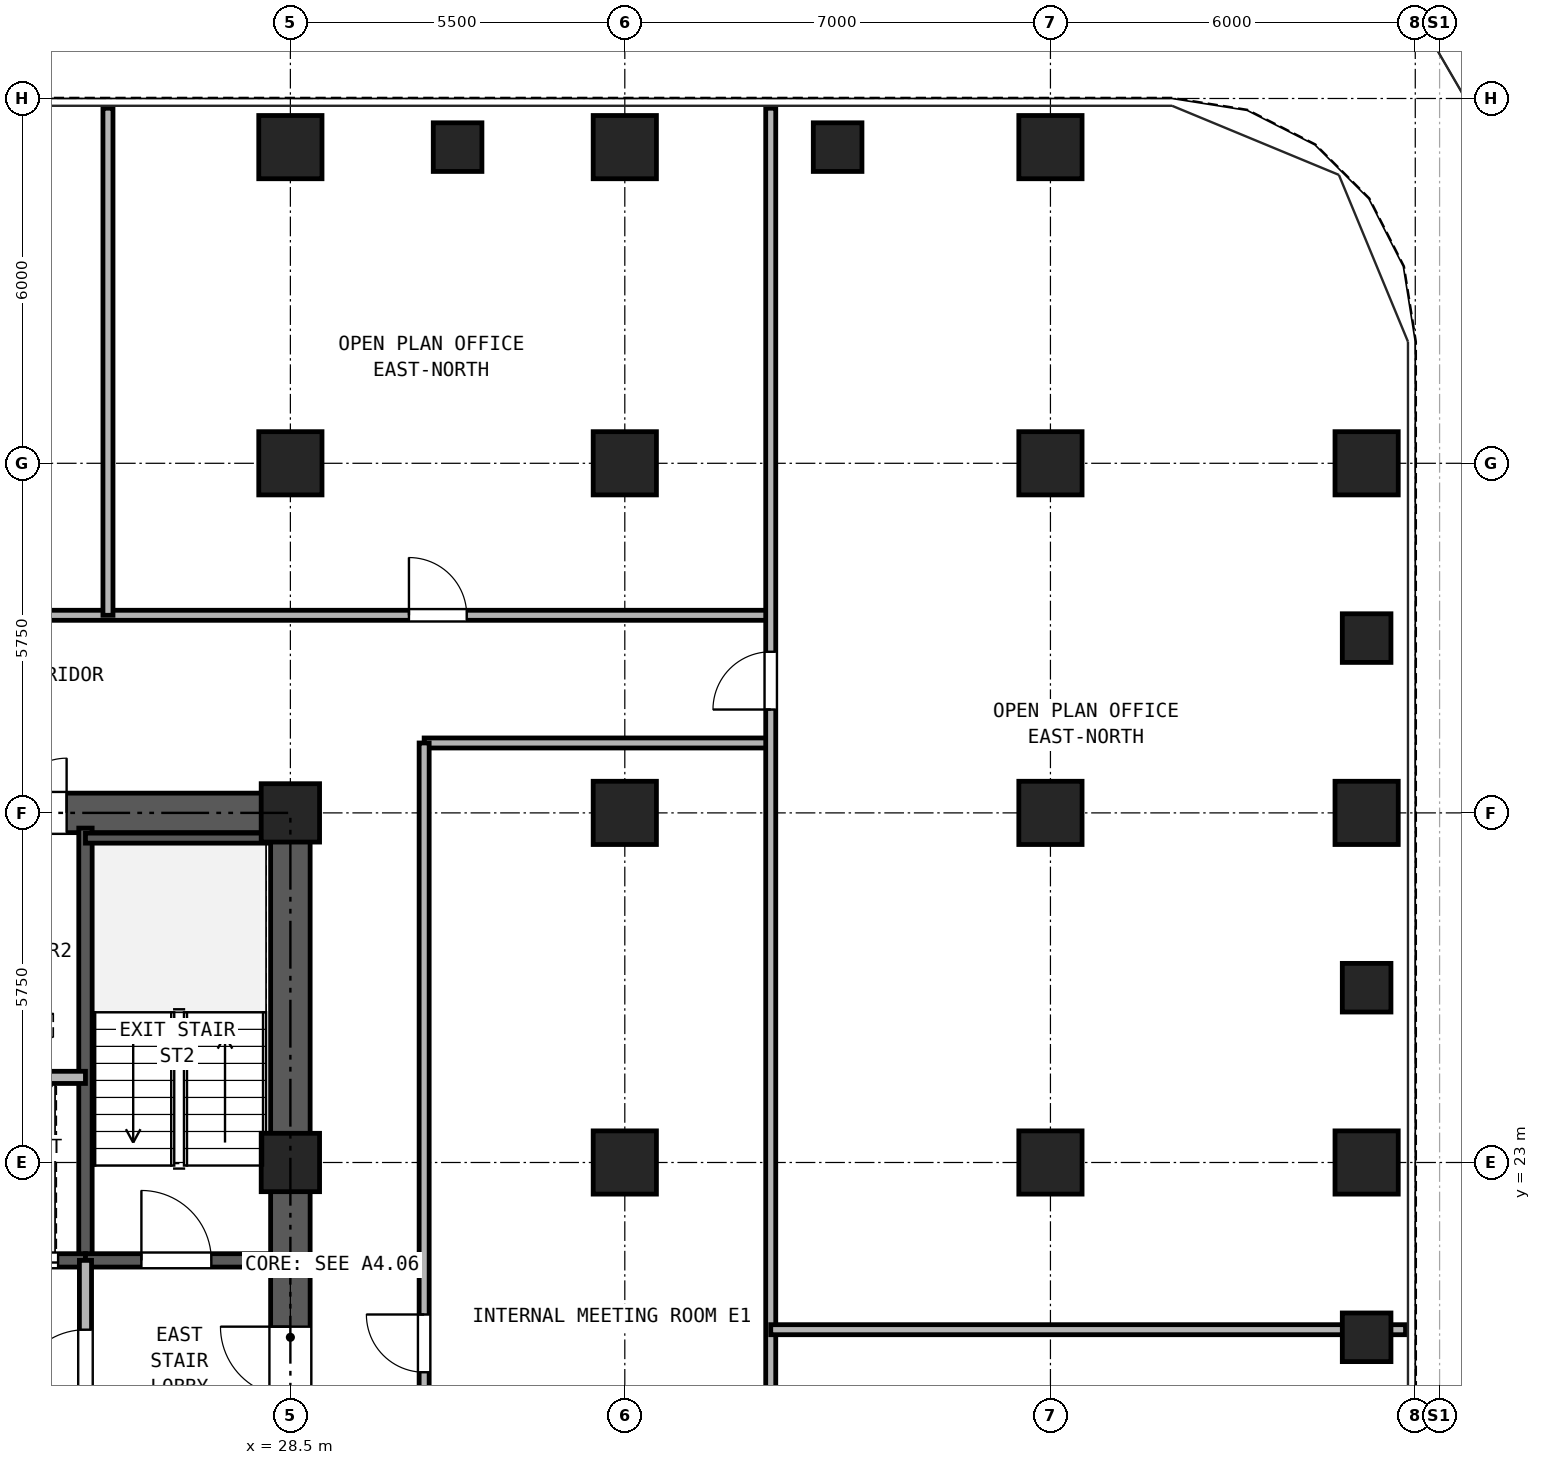
"""IFC4 building model, lengths in metres.
Left out: names, types, materials, properties, quantities, classifications, styles, units other than length and angle.
Written with IfcOpenShell. Run it as: python <this file> out.ifc"""

import sys

from ifc_helpers import new_model, si_unit, direction, frame, frame_2d, origin, origin_2d, place, context, subcontext, project, spatial, rectangle, hollow_rectangle, extrude, source, transform, mapped, element, fill, save


model = new_model("IFC4")
c1 = context("Model", 3, precision=1e-05, world=origin(), true_north=direction((0.0, 1.0)))
c2 = subcontext(c1, "Body", "Model", "MODEL_VIEW")
j1 = project(units=[si_unit("LENGTHUNIT", "METRE"), si_unit("PLANEANGLEUNIT", "RADIAN")], contexts=[c1])
p1 = place(None, origin())
s1 = spatial("IfcSite", under=j1, at=p1, CompositionType="ELEMENT")
p2 = place(p1, origin())
s2 = spatial("IfcBuilding", under=s1, at=p2, CompositionType="ELEMENT")
p3 = place(p2, frame((0.0, 0.0, 44.1)))
s3 = spatial("IfcBuildingStorey", under=s2, at=p3, CompositionType="ELEMENT", Elevation=44.1)
m1 = source(origin(), c2, "Body", "SweptSolid", [
    extrude(hollow_rectangle(XDim=1.04, YDim=1.04, WallThickness=0.065, at=origin_2d()), origin(), (0.0, 0.0, 1.0), 3.32),
])
for number, where, z_axis, x_axis in (
    (1, (28.5, 39.7, 0.0), (0.0, 0.0, 1.0), (1.0, 0.0, 0.0)),
    (2, (34.0, 39.7, 0.0), (0.0, 0.0, 1.0), (1.0, 0.0, 0.0)),
    (3, (41.0, 39.7, 0.0), (0.0, 0.0, 1.0), (1.0, 0.0, 0.0)),
    (4, (46.2, 23.0, 0.0), (0.0, 0.0, 1.0), (1.0, 0.0, 0.0)),
    (5, (46.2, 28.75, 0.0), (0.0, 0.0, 1.0), (1.0, 0.0, 0.0)),
    (6, (46.2, 34.5, 0.0), (0.0, 0.0, 1.0), (1.0, 0.0, 0.0)),
):
    element("IfcColumn", number, at=place(p3, frame(where, z_axis=z_axis, x_axis=x_axis)), inside=s3, PredefinedType="COLUMN", context=c2, shape_type="MappedRepresentation", body=[
        mapped(m1, transform((0.0, 0.0, 0.0), x_axis=(1.0, 0.0, 0.0), y_axis=(0.0, 1.0, 0.0), z_axis=(0.0, 0.0, 1.0), scale=1.0)),
    ])
m2 = source(origin(), c2, "Body", "SweptSolid", [
    extrude(hollow_rectangle(XDim=0.96, YDim=0.96, WallThickness=0.06, at=origin_2d()), origin(), (0.0, 0.0, 1.0), 3.32),
])
for number, where, z_axis, x_axis in (
    (7, (28.5, 23.0, 0.0), (0.0, 0.0, 1.0), (1.0, 0.0, 0.0)),
    (8, (28.5, 28.75, 0.0), (0.0, 0.0, 1.0), (1.0, 0.0, 0.0)),
):
    element("IfcColumn", number, at=place(p3, frame(where, z_axis=z_axis, x_axis=x_axis)), inside=s3, PredefinedType="COLUMN", context=c2, shape_type="MappedRepresentation", body=[
        mapped(m2, transform((0.0, 0.0, 0.0), x_axis=(1.0, 0.0, 0.0), y_axis=(0.0, 1.0, 0.0), z_axis=(0.0, 0.0, 1.0), scale=1.0)),
    ])
for number, where, z_axis, x_axis in (
    (9, (28.5, 34.5, 0.0), (0.0, 0.0, 1.0), (1.0, 0.0, 0.0)),
    (10, (34.0, 23.0, 0.0), (0.0, 0.0, 1.0), (1.0, 0.0, 0.0)),
    (11, (34.0, 28.75, 0.0), (0.0, 0.0, 1.0), (1.0, 0.0, 0.0)),
    (12, (34.0, 34.5, 0.0), (0.0, 0.0, 1.0), (1.0, 0.0, 0.0)),
    (13, (41.0, 23.0, 0.0), (0.0, 0.0, 1.0), (1.0, 0.0, 0.0)),
    (14, (41.0, 28.75, 0.0), (0.0, 0.0, 1.0), (1.0, 0.0, 0.0)),
    (15, (41.0, 34.5, 0.0), (0.0, 0.0, 1.0), (1.0, 0.0, 0.0)),
):
    element("IfcColumn", number, at=place(p3, frame(where, z_axis=z_axis, x_axis=x_axis)), inside=s3, PredefinedType="COLUMN", context=c2, shape_type="MappedRepresentation", body=[
        mapped(m1, transform((0.0, 0.0, 0.0), x_axis=(1.0, 0.0, 0.0), y_axis=(0.0, 1.0, 0.0), z_axis=(0.0, 0.0, 1.0), scale=1.0)),
    ])
m3 = source(origin(), c2, "Body", "SweptSolid", [
    extrude(hollow_rectangle(XDim=0.8, YDim=0.8, WallThickness=0.045, at=origin_2d()), origin(), (0.0, 0.0, 1.0), 3.32),
])
for number, where, z_axis, x_axis in (
    (16, (31.25, 39.7, 0.0), (0.0, 0.0, 1.0), (1.0, 0.0, 0.0)),
    (17, (37.5, 39.7, 0.0), (0.0, 0.0, 1.0), (1.0, 0.0, 0.0)),
    (18, (46.2, 20.125, 0.0), (0.0, 0.0, 1.0), (1.0, 0.0, 0.0)),
    (19, (46.2, 25.875, 0.0), (0.0, 0.0, 1.0), (1.0, 0.0, 0.0)),
    (20, (46.2, 31.625, 0.0), (0.0, 0.0, 1.0), (1.0, 0.0, 0.0)),
):
    element("IfcColumn", number, at=place(p3, frame(where, z_axis=z_axis, x_axis=x_axis)), inside=s3, PredefinedType="COLUMN", context=c2, shape_type="MappedRepresentation", body=[
        mapped(m3, transform((0.0, 0.0, 0.0), x_axis=(1.0, 0.0, 0.0), y_axis=(0.0, 1.0, 0.0), z_axis=(0.0, 0.0, 1.0), scale=1.0)),
    ])
p4 = place(p3, frame((18.175, 28.75, 0.0), z_axis=(0.0, 0.0, 1.0), x_axis=(1.0, 0.0, 0.0)))
e21 = element("IfcWall", 21, at=p4, inside=s3, PredefinedType="SHEAR", context=c2, shape_type="SweptSolid", body=[
    extrude(rectangle(XDim=10.65, YDim=0.65, at=frame_2d((5.325, 0.0))), origin(), (0.0, 0.0, 1.0), 3.32),
])
p5 = place(p4, frame((4.205, 0.0, 0.0)))
e22 = element("IfcOpeningElement", 22, at=p5, cuts=e21, PredefinedType="OPENING", context=c2, shape_type="SweptSolid", body=[
    extrude(rectangle(XDim=0.9, YDim=2.05, at=frame_2d((0.45, 1.025))), frame((0.0, 0.335, 0.0), z_axis=(0.0, -1.0, 0.0), x_axis=(1.0, 0.0, 0.0)), (0.0, 0.0, 1.0), 0.67),
])
p6 = place(p4, frame((5.745, 0.0, 0.0)))
e23 = element("IfcOpeningElement", 23, at=p6, cuts=e21, PredefinedType="OPENING", context=c2, shape_type="SweptSolid", body=[
    extrude(rectangle(XDim=0.9, YDim=2.05, at=frame_2d((0.45, 1.025))), frame((0.0, 0.335, 0.0), z_axis=(0.0, -1.0, 0.0), x_axis=(1.0, 0.0, 0.0)), (0.0, 0.0, 1.0), 0.67),
])
p7 = place(p3, frame((28.5, 11.825, 0.0), z_axis=(0.0, 0.0, 1.0), x_axis=(0.0, 1.0, 0.0)))
e24 = element("IfcWall", 24, at=p7, inside=s3, PredefinedType="SHEAR", context=c2, shape_type="SweptSolid", body=[
    extrude(rectangle(XDim=16.6, YDim=0.65, at=frame_2d((8.3, 0.0))), origin(), (0.0, 0.0, 1.0), 3.32),
])
p8 = place(p7, frame((7.325, 0.0, 0.0)))
e25 = element("IfcOpeningElement", 25, at=p8, cuts=e24, PredefinedType="OPENING", context=c2, shape_type="SweptSolid", body=[
    extrude(rectangle(XDim=1.15, YDim=2.2, at=frame_2d((0.575, 1.1))), frame((0.0, 0.335, 0.0), z_axis=(0.0, -1.0, 0.0), x_axis=(1.0, 0.0, 0.0)), (0.0, 0.0, 1.0), 0.67),
])
p9 = place(p3, frame((25.13, 21.39, 0.0), z_axis=(0.0, 0.0, 1.0), x_axis=(0.0, 1.0, 0.0)))
e26 = element("IfcWall", 26, at=p9, inside=s3, PredefinedType="SOLIDWALL", context=c2, shape_type="SweptSolid", body=[
    extrude(rectangle(XDim=7.11, YDim=0.22, at=frame_2d((3.555, 0.0))), origin(), (0.0, 0.0, 1.0), 3.32),
])
p10 = place(p3, frame((25.13, 28.335, 0.0), z_axis=(0.0, 0.0, 1.0), x_axis=(1.0, 0.0, 0.0)))
e27 = element("IfcWall", 27, at=p10, inside=s3, PredefinedType="PARTITIONING", context=c2, shape_type="SweptSolid", body=[
    extrude(rectangle(XDim=3.035, YDim=0.165, at=frame_2d((1.518, 0.0))), origin(), (0.0, 0.0, 1.0), 3.32),
])
p11 = place(p3, frame((18.835, 21.39, 0.0), z_axis=(0.0, 0.0, 1.0), x_axis=(1.0, 0.0, 0.0)))
e28 = element("IfcWall", 28, at=p11, inside=s3, PredefinedType="SOLIDWALL", context=c2, shape_type="SweptSolid", body=[
    extrude(rectangle(XDim=6.295, YDim=0.22, at=frame_2d((3.147, 0.0))), origin(), (0.0, 0.0, 1.0), 3.32),
])
p12 = place(p11, frame((1.015, 0.0, 0.0)))
e29 = element("IfcOpeningElement", 29, at=p12, cuts=e28, PredefinedType="OPENING", context=c2, shape_type="SweptSolid", body=[
    extrude(rectangle(XDim=1.15, YDim=2.2, at=frame_2d((0.575, 1.1))), frame((0.0, 0.12, 0.0), z_axis=(0.0, -1.0, 0.0), x_axis=(1.0, 0.0, 0.0)), (0.0, 0.0, 1.0), 0.24),
])
p13 = place(p11, frame((4.745, 0.0, 0.0)))
e30 = element("IfcOpeningElement", 30, at=p13, cuts=e28, PredefinedType="OPENING", context=c2, shape_type="SweptSolid", body=[
    extrude(rectangle(XDim=1.1, YDim=2.25, at=frame_2d((0.55, 1.125))), frame((0.0, 0.12, 0.0), z_axis=(0.0, -1.0, 0.0), x_axis=(1.0, 0.0, 0.0)), (0.0, 0.0, 1.0), 0.24),
])
p14 = place(p3, frame((25.13, 21.39, 0.0), z_axis=(0.0, 0.0, 1.0), x_axis=(1.0, 0.0, 0.0)))
e31 = element("IfcWall", 31, at=p14, inside=s3, PredefinedType="SOLIDWALL", context=c2, shape_type="SweptSolid", body=[
    extrude(rectangle(XDim=3.035, YDim=0.22, at=frame_2d((1.518, 0.0))), origin(), (0.0, 0.0, 1.0), 3.32),
])
p15 = place(p14, frame((0.92, 0.0, 0.0)))
e32 = element("IfcOpeningElement", 32, at=p15, cuts=e31, PredefinedType="OPENING", context=c2, shape_type="SweptSolid", body=[
    extrude(rectangle(XDim=1.15, YDim=2.2, at=frame_2d((0.575, 1.1))), frame((0.0, 0.12, 0.0), z_axis=(0.0, -1.0, 0.0), x_axis=(1.0, 0.0, 0.0)), (0.0, 0.0, 1.0), 0.24),
])
p16 = place(p3, frame((22.11, 24.4, 0.0), z_axis=(0.0, 0.0, 1.0), x_axis=(1.0, 0.0, 0.0)))
e33 = element("IfcWall", 33, at=p16, inside=s3, PredefinedType="PARTITIONING", context=c2, shape_type="SweptSolid", body=[
    extrude(rectangle(XDim=3.02, YDim=0.2, at=frame_2d((1.51, 0.0))), origin(), (0.0, 0.0, 1.0), 3.32),
])
p17 = place(p3, frame((25.13, 18.0, 0.0), z_axis=(0.0, 0.0, 1.0), x_axis=(0.0, 1.0, 0.0)))
e34 = element("IfcWall", 34, at=p17, inside=s3, PredefinedType="PARTITIONING", context=c2, shape_type="SweptSolid", body=[
    extrude(rectangle(XDim=3.39, YDim=0.2, at=frame_2d((1.695, 0.0))), origin(), (0.0, 0.0, 1.0), 3.32),
])
p18 = place(p17, frame((1.1, 0.0, 0.0)))
e35 = element("IfcOpeningElement", 35, at=p18, cuts=e34, PredefinedType="OPENING", context=c2, shape_type="SweptSolid", body=[
    extrude(rectangle(XDim=1.15, YDim=2.2, at=frame_2d((0.575, 1.1))), frame((0.0, 0.11, 0.0), z_axis=(0.0, -1.0, 0.0), x_axis=(1.0, 0.0, 0.0)), (0.0, 0.0, 1.0), 0.22),
])
p19 = place(p3, frame((10.6, 32.0, 0.0), z_axis=(0.0, 0.0, 1.0), x_axis=(1.0, 0.0, 0.0)))
e36 = element("IfcWall", 36, at=p19, inside=s3, PredefinedType="PARTITIONING", context=c2, shape_type="SweptSolid", body=[
    extrude(rectangle(XDim=25.8, YDim=0.165, at=frame_2d((12.9, 0.0))), origin(), (0.0, 0.0, 1.0), 3.32),
])
p20 = place(p19, frame((3.45, 0.0, 0.0)))
e37 = element("IfcOpeningElement", 37, at=p20, cuts=e36, PredefinedType="OPENING", context=c2, shape_type="SweptSolid", body=[
    extrude(rectangle(XDim=0.95, YDim=2.15, at=frame_2d((0.475, 1.075))), frame((0.0, 0.093, 0.0), z_axis=(0.0, -1.0, 0.0), x_axis=(1.0, 0.0, 0.0)), (0.0, 0.0, 1.0), 0.185),
])
p21 = place(p19, frame((10.9, 0.0, 0.0)))
e38 = element("IfcOpeningElement", 38, at=p21, cuts=e36, PredefinedType="OPENING", context=c2, shape_type="SweptSolid", body=[
    extrude(rectangle(XDim=0.95, YDim=2.15, at=frame_2d((0.475, 1.075))), frame((0.0, 0.093, 0.0), z_axis=(0.0, -1.0, 0.0), x_axis=(1.0, 0.0, 0.0)), (0.0, 0.0, 1.0), 0.185),
])
p22 = place(p19, frame((19.85, 0.0, 0.0)))
e39 = element("IfcOpeningElement", 39, at=p22, cuts=e36, PredefinedType="OPENING", context=c2, shape_type="SweptSolid", body=[
    extrude(rectangle(XDim=0.95, YDim=2.15, at=frame_2d((0.475, 1.075))), frame((0.0, 0.093, 0.0), z_axis=(0.0, -1.0, 0.0), x_axis=(1.0, 0.0, 0.0)), (0.0, 0.0, 1.0), 0.185),
])
p23 = place(p3, frame((30.7, 29.9, 0.0), z_axis=(0.0, 0.0, 1.0), x_axis=(1.0, 0.0, 0.0)))
e40 = element("IfcWall", 40, at=p23, inside=s3, PredefinedType="PARTITIONING", context=c2, shape_type="SweptSolid", body=[
    extrude(rectangle(XDim=5.7, YDim=0.165, at=frame_2d((2.85, 0.0))), origin(), (0.0, 0.0, 1.0), 3.32),
])
p24 = place(p3, frame((30.7, 10.2, 0.0), z_axis=(0.0, 0.0, 1.0), x_axis=(0.0, 1.0, 0.0)))
e41 = element("IfcWall", 41, at=p24, inside=s3, PredefinedType="PARTITIONING", context=c2, shape_type="SweptSolid", body=[
    extrude(rectangle(XDim=19.7, YDim=0.165, at=frame_2d((9.85, 0.0))), origin(), (0.0, 0.0, 1.0), 3.32),
])
p25 = place(p24, frame((9.35, 0.0, 0.0)))
e42 = element("IfcOpeningElement", 42, at=p25, cuts=e41, PredefinedType="OPENING", context=c2, shape_type="SweptSolid", body=[
    extrude(rectangle(XDim=0.95, YDim=2.15, at=frame_2d((0.475, 1.075))), frame((0.0, 0.093, 0.0), z_axis=(0.0, -1.0, 0.0), x_axis=(1.0, 0.0, 0.0)), (0.0, 0.0, 1.0), 0.185),
])
p26 = place(p3, frame((36.4, 0.16, 0.0), z_axis=(0.0, 0.0, 1.0), x_axis=(0.0, 1.0, 0.0)))
e43 = element("IfcWall", 43, at=p26, inside=s3, PredefinedType="PARTITIONING", context=c2, shape_type="SweptSolid", body=[
    extrude(rectangle(XDim=40.18, YDim=0.165, at=frame_2d((20.09, 0.0))), origin(), (0.0, 0.0, 1.0), 3.32),
])
p27 = place(p26, frame((8.49, 0.0, 0.0)))
e44 = element("IfcOpeningElement", 44, at=p27, cuts=e43, PredefinedType="OPENING", context=c2, shape_type="SweptSolid", body=[
    extrude(rectangle(XDim=0.95, YDim=2.15, at=frame_2d((0.475, 1.075))), frame((0.0, 0.093, 0.0), z_axis=(0.0, -1.0, 0.0), x_axis=(1.0, 0.0, 0.0)), (0.0, 0.0, 1.0), 0.185),
])
p28 = place(p26, frame((30.29, 0.0, 0.0)))
e45 = element("IfcOpeningElement", 45, at=p28, cuts=e43, PredefinedType="OPENING", context=c2, shape_type="SweptSolid", body=[
    extrude(rectangle(XDim=0.95, YDim=2.15, at=frame_2d((0.475, 1.075))), frame((0.0, 0.093, 0.0), z_axis=(0.0, -1.0, 0.0), x_axis=(1.0, 0.0, 0.0)), (0.0, 0.0, 1.0), 0.185),
])
p29 = place(p3, frame((25.5, 32.0, 0.0), z_axis=(0.0, 0.0, 1.0), x_axis=(0.0, 1.0, 0.0)))
e46 = element("IfcWall", 46, at=p29, inside=s3, PredefinedType="PARTITIONING", context=c2, shape_type="SweptSolid", body=[
    extrude(rectangle(XDim=8.34, YDim=0.165, at=frame_2d((4.17, 0.0))), origin(), (0.0, 0.0, 1.0), 3.32),
])
p30 = place(p3, frame((36.4, 20.25, 0.0), z_axis=(0.0, 0.0, 1.0), x_axis=(1.0, 0.0, 0.0)))
e47 = element("IfcWall", 47, at=p30, inside=s3, PredefinedType="PARTITIONING", context=c2, shape_type="SweptSolid", body=[
    extrude(rectangle(XDim=10.44, YDim=0.165, at=frame_2d((5.22, 0.0))), origin(), (0.0, 0.0, 1.0), 2.898),
])
p31 = place(p15, frame((1.15, 0.0, 0.0), z_axis=(0.0, 0.0, 1.0), x_axis=(-1.0, 0.0, 0.0)))
e48 = element("IfcDoor", 48, at=p31, inside=s3, OperationType="SINGLE_SWING_LEFT", PredefinedType="DOOR", context=c2, shape_type="SweptSolid", body=[
    extrude(rectangle(XDim=1.15, YDim=2.2, at=frame_2d((0.575, 1.1))), frame((0.0, 0.025, 0.0), z_axis=(0.0, -1.0, 0.0), x_axis=(1.0, 0.0, 0.0)), (0.0, 0.0, 1.0), 0.05),
])
fill(e32, e48)
p32 = place(p13, frame((1.1, 0.0, 0.0), z_axis=(0.0, 0.0, 1.0), x_axis=(-1.0, 0.0, 0.0)))
e49 = element("IfcDoor", 49, at=p32, inside=s3, OperationType="DOUBLE_DOOR_SLIDING", PredefinedType="DOOR", context=c2, shape_type="SweptSolid", body=[
    extrude(rectangle(XDim=1.1, YDim=2.25, at=frame_2d((0.55, 1.125))), frame((0.0, 0.025, 0.0), z_axis=(0.0, -1.0, 0.0), x_axis=(1.0, 0.0, 0.0)), (0.0, 0.0, 1.0), 0.05),
])
fill(e30, e49)
p33 = place(p18, origin())
e50 = element("IfcDoor", 50, at=p33, inside=s3, OperationType="SINGLE_SWING_LEFT", PredefinedType="DOOR", context=c2, shape_type="SweptSolid", body=[
    extrude(rectangle(XDim=1.15, YDim=2.2, at=frame_2d((0.575, 1.1))), frame((0.0, 0.025, 0.0), z_axis=(0.0, -1.0, 0.0), x_axis=(1.0, 0.0, 0.0)), (0.0, 0.0, 1.0), 0.05),
])
fill(e35, e50)
p34 = place(p8, origin())
e51 = element("IfcDoor", 51, at=p34, inside=s3, OperationType="SINGLE_SWING_RIGHT", PredefinedType="DOOR", context=c2, shape_type="SweptSolid", body=[
    extrude(rectangle(XDim=1.15, YDim=2.2, at=frame_2d((0.575, 1.1))), frame((0.0, 0.025, 0.0), z_axis=(0.0, -1.0, 0.0), x_axis=(1.0, 0.0, 0.0)), (0.0, 0.0, 1.0), 0.05),
])
fill(e25, e51)
p35 = place(p6, origin())
e52 = element("IfcDoor", 52, at=p35, inside=s3, OperationType="SINGLE_SWING_RIGHT", PredefinedType="DOOR", context=c2, shape_type="SweptSolid", body=[
    extrude(rectangle(XDim=0.9, YDim=2.05, at=frame_2d((0.45, 1.025))), frame((0.0, 0.025, 0.0), z_axis=(0.0, -1.0, 0.0), x_axis=(1.0, 0.0, 0.0)), (0.0, 0.0, 1.0), 0.05),
])
fill(e23, e52)
p36 = place(p22, origin())
e53 = element("IfcDoor", 53, at=p36, inside=s3, OperationType="SINGLE_SWING_LEFT", PredefinedType="DOOR", context=c2, shape_type="SweptSolid", body=[
    extrude(rectangle(XDim=0.95, YDim=2.15, at=frame_2d((0.475, 1.075))), frame((0.0, 0.025, 0.0), z_axis=(0.0, -1.0, 0.0), x_axis=(1.0, 0.0, 0.0)), (0.0, 0.0, 1.0), 0.05),
])
fill(e39, e53)
p37 = place(p28, origin())
e54 = element("IfcDoor", 54, at=p37, inside=s3, OperationType="SINGLE_SWING_LEFT", PredefinedType="DOOR", context=c2, shape_type="SweptSolid", body=[
    extrude(rectangle(XDim=0.95, YDim=2.15, at=frame_2d((0.475, 1.075))), frame((0.0, 0.025, 0.0), z_axis=(0.0, -1.0, 0.0), x_axis=(1.0, 0.0, 0.0)), (0.0, 0.0, 1.0), 0.05),
])
fill(e45, e54)
p38 = place(p25, origin())
e55 = element("IfcDoor", 55, at=p38, inside=s3, OperationType="SINGLE_SWING_RIGHT", PredefinedType="DOOR", context=c2, shape_type="SweptSolid", body=[
    extrude(rectangle(XDim=0.95, YDim=2.15, at=frame_2d((0.475, 1.075))), frame((0.0, 0.025, 0.0), z_axis=(0.0, -1.0, 0.0), x_axis=(1.0, 0.0, 0.0)), (0.0, 0.0, 1.0), 0.05),
])
fill(e42, e55)
save(model, sys.argv[1])
